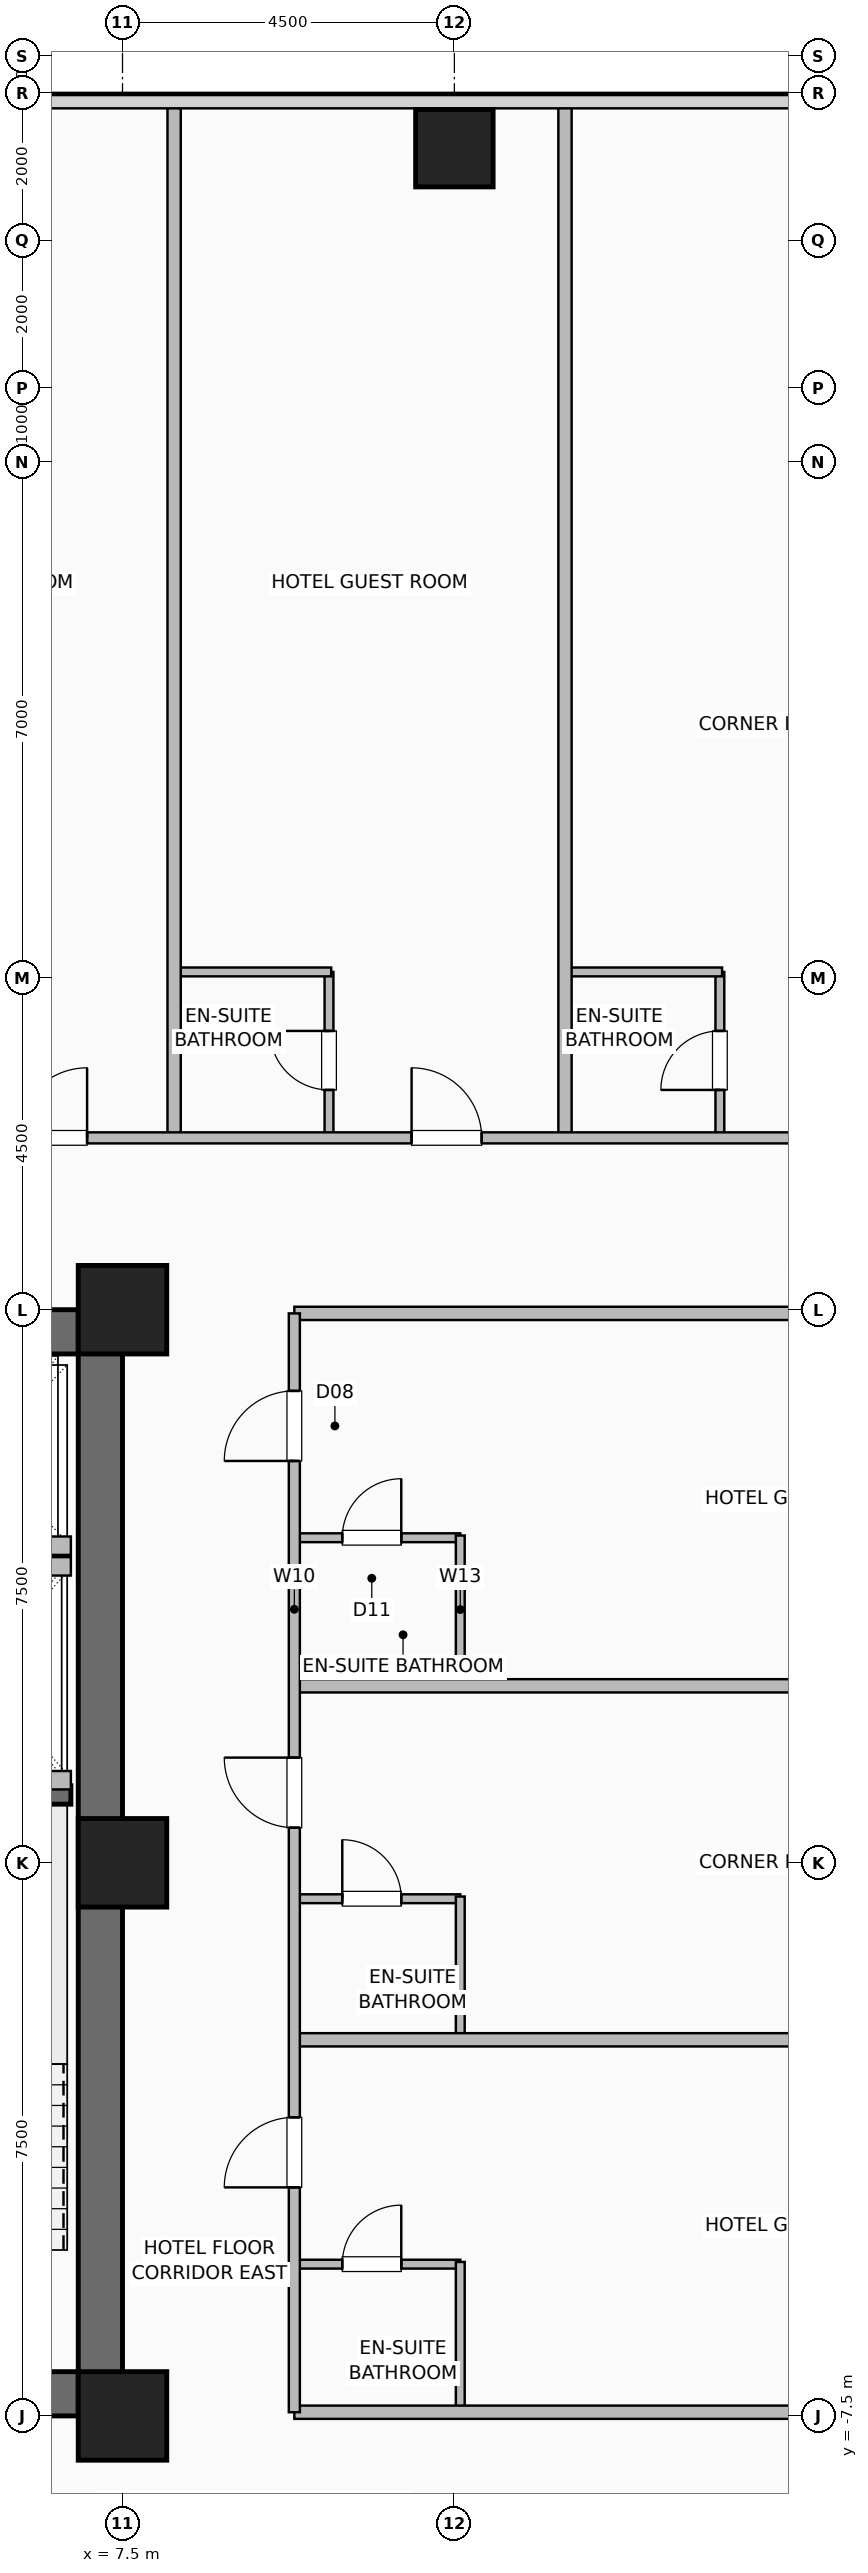
"""IFC4 building model, lengths in metres.
Left out: names, types, materials, properties, quantities, classifications, styles, units other than length and angle.
Written with IfcOpenShell. Run it as: python <this file> out.ifc"""

import sys

from ifc_helpers import new_model, si_unit, direction, frame, frame_2d, origin, origin_2d, place, context, subcontext, project, spatial, rectangle, hollow_rectangle, extrude, element, fill, save


model = new_model("IFC4")
c1 = context("Model", 3, precision=1e-05, world=origin(), true_north=direction((0.0, 1.0)))
c2 = subcontext(c1, "Body", "Model", "MODEL_VIEW")
j1 = project(units=[si_unit("LENGTHUNIT", "METRE"), si_unit("PLANEANGLEUNIT", "RADIAN")], contexts=[c1])
p1 = place(None, origin())
s1 = spatial("IfcSite", under=j1, at=p1, CompositionType="ELEMENT")
p2 = place(p1, origin())
s2 = spatial("IfcBuilding", under=s1, at=p2, CompositionType="ELEMENT")
p3 = place(p2, frame((0.0, 0.0, 72.5)))
s3 = spatial("IfcBuildingStorey", under=s2, at=p3, CompositionType="ELEMENT", Elevation=72.5)
for number, where, z_axis, x_axis in (
    (1, (7.5, -7.5, 0.0), (0.0, 0.0, 1.0), (1.0, 0.0, 0.0)),
    (2, (7.5, 0.0, 0.0), (0.0, 0.0, 1.0), (1.0, 0.0, 0.0)),
    (3, (7.5, 7.5, 0.0), (0.0, 0.0, 1.0), (1.0, 0.0, 0.0)),
):
    element("IfcColumn", number, at=place(p3, frame(where, z_axis=z_axis, x_axis=x_axis)), inside=s3, PredefinedType="COLUMN", context=c2, shape_type="SweptSolid", body=[
        extrude(hollow_rectangle(XDim=1.2, YDim=1.2, WallThickness=0.055, at=origin_2d()), origin(), (0.0, 0.0, 1.0), 3.5),
    ])
p4 = place(p3, frame((12.0, 23.25, 0.0), z_axis=(0.0, 0.0, 1.0), x_axis=(1.0, 0.0, 0.0)))
e4 = element("IfcColumn", 4, at=p4, inside=s3, PredefinedType="COLUMN", context=c2, shape_type="SweptSolid", body=[
    extrude(hollow_rectangle(XDim=1.05, YDim=1.05, WallThickness=0.05, at=origin_2d()), origin(), (0.0, 0.0, 1.0), 3.5),
])
p5 = place(p3, frame((-7.5, -7.2, 0.0), z_axis=(0.0, 0.0, 1.0), x_axis=(1.0, 0.0, 0.0)))
e5 = element("IfcWall", 5, at=p5, inside=s3, PredefinedType="SHEAR", context=c2, shape_type="SweptSolid", body=[
    extrude(rectangle(XDim=15.0, YDim=0.6, at=frame_2d((7.5, 0.0))), origin(), (0.0, 0.0, 1.0), 3.25),
])
p6 = place(p5, frame((1.55, 0.0, 0.0)))
e6 = element("IfcOpeningElement", 6, at=p6, cuts=e5, PredefinedType="OPENING", context=c2, shape_type="SweptSolid", body=[
    extrude(rectangle(XDim=1.05, YDim=2.08, at=frame_2d((0.525, 1.04))), frame((0.0, 0.31, 0.0), z_axis=(0.0, -1.0, 0.0), x_axis=(1.0, 0.0, 0.0)), (0.0, 0.0, 1.0), 0.62),
])
p7 = place(p5, frame((12.4, 0.0, 0.0)))
e7 = element("IfcOpeningElement", 7, at=p7, cuts=e5, PredefinedType="OPENING", context=c2, shape_type="SweptSolid", body=[
    extrude(rectangle(XDim=1.05, YDim=2.08, at=frame_2d((0.525, 1.04))), frame((0.0, 0.31, 0.0), z_axis=(0.0, -1.0, 0.0), x_axis=(1.0, 0.0, 0.0)), (0.0, 0.0, 1.0), 0.62),
])
p8 = place(p5, frame((4.64, 0.0, 0.0)))
e8 = element("IfcOpeningElement", 8, at=p8, cuts=e5, PredefinedType="OPENING", context=c2, shape_type="SweptSolid", body=[
    extrude(rectangle(XDim=1.1, YDim=2.2, at=frame_2d((0.55, 1.1))), frame((0.0, 0.31, 0.0), z_axis=(0.0, -1.0, 0.0), x_axis=(1.0, 0.0, 0.0)), (0.0, 0.0, 1.0), 0.62),
])
p9 = place(p5, frame((6.52, 0.0, 0.0)))
e9 = element("IfcOpeningElement", 9, at=p9, cuts=e5, PredefinedType="OPENING", context=c2, shape_type="SweptSolid", body=[
    extrude(rectangle(XDim=1.1, YDim=2.2, at=frame_2d((0.55, 1.1))), frame((0.0, 0.31, 0.0), z_axis=(0.0, -1.0, 0.0), x_axis=(1.0, 0.0, 0.0)), (0.0, 0.0, 1.0), 0.62),
])
p10 = place(p5, frame((8.4, 0.0, 0.0)))
e10 = element("IfcOpeningElement", 10, at=p10, cuts=e5, PredefinedType="OPENING", context=c2, shape_type="SweptSolid", body=[
    extrude(rectangle(XDim=1.1, YDim=2.2, at=frame_2d((0.55, 1.1))), frame((0.0, 0.31, 0.0), z_axis=(0.0, -1.0, 0.0), x_axis=(1.0, 0.0, 0.0)), (0.0, 0.0, 1.0), 0.62),
])
for number, where, z_axis, x_axis in (
    (11, (-7.5, 7.2, 0.0), (0.0, 0.0, 1.0), (1.0, 0.0, 0.0)),
    (12, (7.2, -7.5, 0.0), (0.0, 0.0, 1.0), (0.0, 1.0, 0.0)),
):
    element("IfcWall", number, at=place(p3, frame(where, z_axis=z_axis, x_axis=x_axis)), inside=s3, PredefinedType="SHEAR", context=c2, shape_type="SweptSolid", body=[
        extrude(rectangle(XDim=15.0, YDim=0.6, at=frame_2d((7.5, 0.0))), origin(), (0.0, 0.0, 1.0), 3.25),
    ])
p11 = place(p3, frame((3.47, 0.92, 0.0), z_axis=(0.0, 0.0, 1.0), x_axis=(1.0, 0.0, 0.0)))
e13 = element("IfcWall", 13, at=p11, inside=s3, PredefinedType="SHEAR", context=c2, shape_type="SweptSolid", body=[
    extrude(rectangle(XDim=3.33, YDim=0.25, at=frame_2d((1.665, 0.0))), origin(), (0.0, 0.0, 1.0), 3.25),
])
p12 = place(p3, frame((4.38, 4.3, 0.0), z_axis=(0.0, 0.0, 1.0), x_axis=(1.0, 0.0, 0.0)))
e14 = element("IfcWall", 14, at=p12, inside=s3, PredefinedType="SHEAR", context=c2, shape_type="SweptSolid", body=[
    extrude(rectangle(XDim=2.42, YDim=0.25, at=frame_2d((1.21, 0.0))), origin(), (0.0, 0.0, 1.0), 3.25),
])
for number, where, z_axis, x_axis in (
    (15, (4.28, 1.12, 0.0), (0.0, 0.0, 1.0), (1.0, 0.0, 0.0)),
    (16, (4.28, 4.02, 0.0), (0.0, 0.0, 1.0), (1.0, 0.0, 0.0)),
):
    element("IfcWall", number, at=place(p3, frame(where, z_axis=z_axis, x_axis=x_axis)), inside=s3, PredefinedType="SHEAR", context=c2, shape_type="SweptSolid", body=[
        extrude(rectangle(XDim=2.52, YDim=0.25, at=frame_2d((1.26, 0.0))), origin(), (0.0, 0.0, 1.0), 3.25),
    ])
p13 = place(p3, frame((10.3, 9.83, 0.0), z_axis=(0.0, 0.0, 1.0), x_axis=(0.0, 1.0, 0.0)))
e17 = element("IfcWall", 17, at=p13, inside=s3, PredefinedType="PLUMBINGWALL", context=c2, shape_type="SweptSolid", body=[
    extrude(rectangle(XDim=2.25, YDim=0.12, at=frame_2d((1.125, 0.0))), origin(), (0.0, 0.0, 1.0), 3.25),
])
p14 = place(p13, frame((0.65, 0.0, 0.0)))
e18 = element("IfcOpeningElement", 18, at=p14, cuts=e17, PredefinedType="OPENING", context=c2, shape_type="SweptSolid", body=[
    extrude(rectangle(XDim=0.8, YDim=2.05, at=frame_2d((0.4, 1.025))), frame((0.0, 0.07, 0.0), z_axis=(0.0, -1.0, 0.0), x_axis=(1.0, 0.0, 0.0)), (0.0, 0.0, 1.0), 0.14),
])
p15 = place(p3, frame((8.23, 12.08, 0.0), z_axis=(0.0, 0.0, 1.0), x_axis=(1.0, 0.0, 0.0)))
e19 = element("IfcWall", 19, at=p15, inside=s3, PredefinedType="PLUMBINGWALL", context=c2, shape_type="SweptSolid", body=[
    extrude(rectangle(XDim=2.1, YDim=0.12, at=frame_2d((1.05, 0.0))), origin(), (0.0, 0.0, 1.0), 3.25),
])
p16 = place(p3, frame((15.6, 9.83, 0.0), z_axis=(0.0, 0.0, 1.0), x_axis=(0.0, 1.0, 0.0)))
e20 = element("IfcWall", 20, at=p16, inside=s3, PredefinedType="PLUMBINGWALL", context=c2, shape_type="SweptSolid", body=[
    extrude(rectangle(XDim=2.25, YDim=0.12, at=frame_2d((1.125, 0.0))), origin(), (0.0, 0.0, 1.0), 3.25),
])
p17 = place(p16, frame((0.65, 0.0, 0.0)))
e21 = element("IfcOpeningElement", 21, at=p17, cuts=e20, PredefinedType="OPENING", context=c2, shape_type="SweptSolid", body=[
    extrude(rectangle(XDim=0.8, YDim=2.05, at=frame_2d((0.4, 1.025))), frame((0.0, 0.07, 0.0), z_axis=(0.0, -1.0, 0.0), x_axis=(1.0, 0.0, 0.0)), (0.0, 0.0, 1.0), 0.14),
])
p18 = place(p3, frame((13.53, 12.08, 0.0), z_axis=(0.0, 0.0, 1.0), x_axis=(1.0, 0.0, 0.0)))
e22 = element("IfcWall", 22, at=p18, inside=s3, PredefinedType="PLUMBINGWALL", context=c2, shape_type="SweptSolid", body=[
    extrude(rectangle(XDim=2.1, YDim=0.12, at=frame_2d((1.05, 0.0))), origin(), (0.0, 0.0, 1.0), 3.25),
])
for number, where, z_axis, x_axis in (
    (23, (8.2, 9.83, 0.0), (0.0, 0.0, 1.0), (0.0, 1.0, 0.0)),
    (24, (13.5, 9.83, 0.0), (0.0, 0.0, 1.0), (0.0, 1.0, 0.0)),
):
    element("IfcWall", number, at=place(p3, frame(where, z_axis=z_axis, x_axis=x_axis)), inside=s3, PredefinedType="PARTITIONING", context=c2, shape_type="SweptSolid", body=[
        extrude(rectangle(XDim=13.99, YDim=0.18, at=frame_2d((6.995, 0.0))), origin(), (0.0, 0.0, 1.0), 3.25),
    ])
p19 = place(p3, frame((-19.95, 9.83, 0.0), z_axis=(0.0, 0.0, 1.0), x_axis=(1.0, 0.0, 0.0)))
e25 = element("IfcWall", 25, at=p19, inside=s3, PredefinedType="PARTITIONING", context=c2, shape_type="SweptSolid", body=[
    extrude(rectangle(XDim=39.9, YDim=0.15, at=frame_2d((19.95, 0.0))), origin(), (0.0, 0.0, 1.0), 3.25),
])
p20 = place(p19, frame((3.945, 0.0, 0.0)))
e26 = element("IfcOpeningElement", 26, at=p20, cuts=e25, PredefinedType="OPENING", context=c2, shape_type="SweptSolid", body=[
    extrude(rectangle(XDim=0.95, YDim=2.08, at=frame_2d((0.475, 1.04))), frame((0.0, 0.085, 0.0), z_axis=(0.0, -1.0, 0.0), x_axis=(1.0, 0.0, 0.0)), (0.0, 0.0, 1.0), 0.17),
])
p21 = place(p19, frame((10.02, 0.0, 0.0)))
e27 = element("IfcOpeningElement", 27, at=p21, cuts=e25, PredefinedType="OPENING", context=c2, shape_type="SweptSolid", body=[
    extrude(rectangle(XDim=0.95, YDim=2.08, at=frame_2d((0.475, 1.04))), frame((0.0, 0.085, 0.0), z_axis=(0.0, -1.0, 0.0), x_axis=(1.0, 0.0, 0.0)), (0.0, 0.0, 1.0), 0.17),
])
p22 = place(p19, frame((15.42, 0.0, 0.0)))
e28 = element("IfcOpeningElement", 28, at=p22, cuts=e25, PredefinedType="OPENING", context=c2, shape_type="SweptSolid", body=[
    extrude(rectangle(XDim=0.95, YDim=2.08, at=frame_2d((0.475, 1.04))), frame((0.0, 0.085, 0.0), z_axis=(0.0, -1.0, 0.0), x_axis=(1.0, 0.0, 0.0)), (0.0, 0.0, 1.0), 0.17),
])
p23 = place(p19, frame((20.702, 0.0, 0.0)))
e29 = element("IfcOpeningElement", 29, at=p23, cuts=e25, PredefinedType="OPENING", context=c2, shape_type="SweptSolid", body=[
    extrude(rectangle(XDim=0.95, YDim=2.08, at=frame_2d((0.475, 1.04))), frame((0.0, 0.085, 0.0), z_axis=(0.0, -1.0, 0.0), x_axis=(1.0, 0.0, 0.0)), (0.0, 0.0, 1.0), 0.17),
])
p24 = place(p19, frame((26.02, 0.0, 0.0)))
e30 = element("IfcOpeningElement", 30, at=p24, cuts=e25, PredefinedType="OPENING", context=c2, shape_type="SweptSolid", body=[
    extrude(rectangle(XDim=0.95, YDim=2.08, at=frame_2d((0.475, 1.04))), frame((0.0, 0.085, 0.0), z_axis=(0.0, -1.0, 0.0), x_axis=(1.0, 0.0, 0.0)), (0.0, 0.0, 1.0), 0.17),
])
p25 = place(p19, frame((31.37, 0.0, 0.0)))
e31 = element("IfcOpeningElement", 31, at=p25, cuts=e25, PredefinedType="OPENING", context=c2, shape_type="SweptSolid", body=[
    extrude(rectangle(XDim=0.95, YDim=2.08, at=frame_2d((0.475, 1.04))), frame((0.0, 0.085, 0.0), z_axis=(0.0, -1.0, 0.0), x_axis=(1.0, 0.0, 0.0)), (0.0, 0.0, 1.0), 0.17),
])
p26 = place(p19, frame((37.245, 0.0, 0.0)))
e32 = element("IfcOpeningElement", 32, at=p26, cuts=e25, PredefinedType="OPENING", context=c2, shape_type="SweptSolid", body=[
    extrude(rectangle(XDim=0.95, YDim=2.08, at=frame_2d((0.475, 1.04))), frame((0.0, 0.085, 0.0), z_axis=(0.0, -1.0, 0.0), x_axis=(1.0, 0.0, 0.0)), (0.0, 0.0, 1.0), 0.17),
])
p27 = place(p3, frame((9.83, -5.442, 0.0), z_axis=(0.0, 0.0, 1.0), x_axis=(1.0, 0.0, 0.0)))
e33 = element("IfcWall", 33, at=p27, inside=s3, PredefinedType="PLUMBINGWALL", context=c2, shape_type="SweptSolid", body=[
    extrude(rectangle(XDim=2.25, YDim=0.12, at=frame_2d((1.125, 0.0))), origin(), (0.0, 0.0, 1.0), 3.25),
])
p28 = place(p27, frame((0.65, 0.0, 0.0)))
e34 = element("IfcOpeningElement", 34, at=p28, cuts=e33, PredefinedType="OPENING", context=c2, shape_type="SweptSolid", body=[
    extrude(rectangle(XDim=0.8, YDim=2.05, at=frame_2d((0.4, 1.025))), frame((0.0, 0.07, 0.0), z_axis=(0.0, -1.0, 0.0), x_axis=(1.0, 0.0, 0.0)), (0.0, 0.0, 1.0), 0.14),
])
p29 = place(p3, frame((12.08, -7.42, 0.0), z_axis=(0.0, 0.0, 1.0), x_axis=(0.0, 1.0, 0.0)))
e35 = element("IfcWall", 35, at=p29, inside=s3, PredefinedType="PLUMBINGWALL", context=c2, shape_type="SweptSolid", body=[
    extrude(rectangle(XDim=2.008, YDim=0.12, at=frame_2d((1.004, 0.0))), origin(), (0.0, 0.0, 1.0), 3.25),
])
p30 = place(p3, frame((9.83, -0.487, 0.0), z_axis=(0.0, 0.0, 1.0), x_axis=(1.0, 0.0, 0.0)))
e36 = element("IfcWall", 36, at=p30, inside=s3, PredefinedType="PLUMBINGWALL", context=c2, shape_type="SweptSolid", body=[
    extrude(rectangle(XDim=2.25, YDim=0.12, at=frame_2d((1.125, 0.0))), origin(), (0.0, 0.0, 1.0), 3.25),
])
p31 = place(p30, frame((0.65, 0.0, 0.0)))
e37 = element("IfcOpeningElement", 37, at=p31, cuts=e36, PredefinedType="OPENING", context=c2, shape_type="SweptSolid", body=[
    extrude(rectangle(XDim=0.8, YDim=2.05, at=frame_2d((0.4, 1.025))), frame((0.0, 0.07, 0.0), z_axis=(0.0, -1.0, 0.0), x_axis=(1.0, 0.0, 0.0)), (0.0, 0.0, 1.0), 0.14),
])
p32 = place(p3, frame((12.08, -2.37, 0.0), z_axis=(0.0, 0.0, 1.0), x_axis=(0.0, 1.0, 0.0)))
e38 = element("IfcWall", 38, at=p32, inside=s3, PredefinedType="PLUMBINGWALL", context=c2, shape_type="SweptSolid", body=[
    extrude(rectangle(XDim=1.913, YDim=0.12, at=frame_2d((0.957, 0.0))), origin(), (0.0, 0.0, 1.0), 3.25),
])
p33 = place(p3, frame((9.83, 4.408, 0.0), z_axis=(0.0, 0.0, 1.0), x_axis=(1.0, 0.0, 0.0)))
e39 = element("IfcWall", 39, at=p33, inside=s3, PredefinedType="PLUMBINGWALL", context=c2, shape_type="SweptSolid", body=[
    extrude(rectangle(XDim=2.25, YDim=0.12, at=frame_2d((1.125, 0.0))), origin(), (0.0, 0.0, 1.0), 3.25),
])
p34 = place(p33, frame((0.65, 0.0, 0.0)))
e40 = element("IfcOpeningElement", 40, at=p34, cuts=e39, PredefinedType="OPENING", context=c2, shape_type="SweptSolid", body=[
    extrude(rectangle(XDim=0.8, YDim=2.05, at=frame_2d((0.4, 1.025))), frame((0.0, 0.07, 0.0), z_axis=(0.0, -1.0, 0.0), x_axis=(1.0, 0.0, 0.0)), (0.0, 0.0, 1.0), 0.14),
])
p35 = place(p3, frame((12.08, 2.43, 0.0), z_axis=(0.0, 0.0, 1.0), x_axis=(0.0, 1.0, 0.0)))
e41 = element("IfcWall", 41, at=p35, inside=s3, PredefinedType="PLUMBINGWALL", context=c2, shape_type="SweptSolid", body=[
    extrude(rectangle(XDim=2.008, YDim=0.12, at=frame_2d((1.004, 0.0))), origin(), (0.0, 0.0, 1.0), 3.25),
])
for number, where, z_axis, x_axis in (
    (42, (9.83, -7.45, 0.0), (0.0, 0.0, 1.0), (1.0, 0.0, 0.0)),
    (43, (9.83, -2.4, 0.0), (0.0, 0.0, 1.0), (1.0, 0.0, 0.0)),
    (44, (9.83, 2.4, 0.0), (0.0, 0.0, 1.0), (1.0, 0.0, 0.0)),
    (45, (9.83, 7.45, 0.0), (0.0, 0.0, 1.0), (1.0, 0.0, 0.0)),
):
    element("IfcWall", number, at=place(p3, frame(where, z_axis=z_axis, x_axis=x_axis)), inside=s3, PredefinedType="PARTITIONING", context=c2, shape_type="SweptSolid", body=[
        extrude(rectangle(XDim=13.99, YDim=0.18, at=frame_2d((6.995, 0.0))), origin(), (0.0, 0.0, 1.0), 3.25),
    ])
p36 = place(p3, frame((9.83, -7.45, 0.0), z_axis=(0.0, 0.0, 1.0), x_axis=(0.0, 1.0, 0.0)))
e46 = element("IfcWall", 46, at=p36, inside=s3, PredefinedType="PARTITIONING", context=c2, shape_type="SweptSolid", body=[
    extrude(rectangle(XDim=14.9, YDim=0.15, at=frame_2d((7.45, 0.0))), origin(), (0.0, 0.0, 1.0), 3.25),
])
p37 = place(p36, frame((3.049, 0.0, 0.0)))
e47 = element("IfcOpeningElement", 47, at=p37, cuts=e46, PredefinedType="OPENING", context=c2, shape_type="SweptSolid", body=[
    extrude(rectangle(XDim=0.95, YDim=2.08, at=frame_2d((0.475, 1.04))), frame((0.0, 0.085, 0.0), z_axis=(0.0, -1.0, 0.0), x_axis=(1.0, 0.0, 0.0)), (0.0, 0.0, 1.0), 0.17),
])
p38 = place(p36, frame((7.927, 0.0, 0.0)))
e48 = element("IfcOpeningElement", 48, at=p38, cuts=e46, PredefinedType="OPENING", context=c2, shape_type="SweptSolid", body=[
    extrude(rectangle(XDim=0.95, YDim=2.08, at=frame_2d((0.475, 1.04))), frame((0.0, 0.085, 0.0), z_axis=(0.0, -1.0, 0.0), x_axis=(1.0, 0.0, 0.0)), (0.0, 0.0, 1.0), 0.17),
])
p39 = place(p36, frame((12.899, 0.0, 0.0)))
e49 = element("IfcOpeningElement", 49, at=p39, cuts=e46, PredefinedType="OPENING", context=c2, shape_type="SweptSolid", body=[
    extrude(rectangle(XDim=0.95, YDim=2.08, at=frame_2d((0.475, 1.04))), frame((0.0, 0.085, 0.0), z_axis=(0.0, -1.0, 0.0), x_axis=(1.0, 0.0, 0.0)), (0.0, 0.0, 1.0), 0.17),
])
p40 = place(p14, origin())
e50 = element("IfcDoor", 50, at=p40, inside=s3, OperationType="SINGLE_SWING_RIGHT", PredefinedType="DOOR", context=c2, shape_type="SweptSolid", body=[
    extrude(rectangle(XDim=0.8, YDim=2.05, at=frame_2d((0.4, 1.025))), frame((0.0, 0.025, 0.0), z_axis=(0.0, -1.0, 0.0), x_axis=(1.0, 0.0, 0.0)), (0.0, 0.0, 1.0), 0.05),
])
fill(e18, e50)
p41 = place(p17, origin())
e51 = element("IfcDoor", 51, at=p41, inside=s3, OperationType="SINGLE_SWING_LEFT", PredefinedType="DOOR", context=c2, shape_type="SweptSolid", body=[
    extrude(rectangle(XDim=0.8, YDim=2.05, at=frame_2d((0.4, 1.025))), frame((0.0, 0.025, 0.0), z_axis=(0.0, -1.0, 0.0), x_axis=(1.0, 0.0, 0.0)), (0.0, 0.0, 1.0), 0.05),
])
fill(e21, e51)
p42 = place(p24, origin())
e52 = element("IfcDoor", 52, at=p42, inside=s3, OperationType="SINGLE_SWING_RIGHT", PredefinedType="DOOR", context=c2, shape_type="SweptSolid", body=[
    extrude(rectangle(XDim=0.95, YDim=2.08, at=frame_2d((0.475, 1.04))), frame((0.0, 0.025, 0.0), z_axis=(0.0, -1.0, 0.0), x_axis=(1.0, 0.0, 0.0)), (0.0, 0.0, 1.0), 0.05),
])
fill(e30, e52)
p43 = place(p25, origin())
e53 = element("IfcDoor", 53, at=p43, inside=s3, OperationType="SINGLE_SWING_LEFT", PredefinedType="DOOR", context=c2, shape_type="SweptSolid", body=[
    extrude(rectangle(XDim=0.95, YDim=2.08, at=frame_2d((0.475, 1.04))), frame((0.0, 0.025, 0.0), z_axis=(0.0, -1.0, 0.0), x_axis=(1.0, 0.0, 0.0)), (0.0, 0.0, 1.0), 0.05),
])
fill(e31, e53)
p44 = place(p28, origin())
e54 = element("IfcDoor", 54, at=p44, inside=s3, OperationType="SINGLE_SWING_RIGHT", PredefinedType="DOOR", context=c2, shape_type="SweptSolid", body=[
    extrude(rectangle(XDim=0.8, YDim=2.05, at=frame_2d((0.4, 1.025))), frame((0.0, 0.025, 0.0), z_axis=(0.0, -1.0, 0.0), x_axis=(1.0, 0.0, 0.0)), (0.0, 0.0, 1.0), 0.05),
])
fill(e34, e54)
p45 = place(p31, origin())
e55 = element("IfcDoor", 55, at=p45, inside=s3, OperationType="SINGLE_SWING_LEFT", PredefinedType="DOOR", context=c2, shape_type="SweptSolid", body=[
    extrude(rectangle(XDim=0.8, YDim=2.05, at=frame_2d((0.4, 1.025))), frame((0.0, 0.025, 0.0), z_axis=(0.0, -1.0, 0.0), x_axis=(1.0, 0.0, 0.0)), (0.0, 0.0, 1.0), 0.05),
])
fill(e37, e55)
p46 = place(p34, origin())
e56 = element("IfcDoor", 56, at=p46, inside=s3, OperationType="SINGLE_SWING_RIGHT", PredefinedType="DOOR", context=c2, shape_type="SweptSolid", body=[
    extrude(rectangle(XDim=0.8, YDim=2.05, at=frame_2d((0.4, 1.025))), frame((0.0, 0.025, 0.0), z_axis=(0.0, -1.0, 0.0), x_axis=(1.0, 0.0, 0.0)), (0.0, 0.0, 1.0), 0.05),
])
fill(e40, e56)
p47 = place(p37, origin())
e57 = element("IfcDoor", 57, at=p47, inside=s3, OperationType="SINGLE_SWING_LEFT", PredefinedType="DOOR", context=c2, shape_type="SweptSolid", body=[
    extrude(rectangle(XDim=0.95, YDim=2.08, at=frame_2d((0.475, 1.04))), frame((0.0, 0.025, 0.0), z_axis=(0.0, -1.0, 0.0), x_axis=(1.0, 0.0, 0.0)), (0.0, 0.0, 1.0), 0.05),
])
fill(e47, e57)
p48 = place(p38, origin())
e58 = element("IfcDoor", 58, at=p48, inside=s3, OperationType="SINGLE_SWING_RIGHT", PredefinedType="DOOR", context=c2, shape_type="SweptSolid", body=[
    extrude(rectangle(XDim=0.95, YDim=2.08, at=frame_2d((0.475, 1.04))), frame((0.0, 0.025, 0.0), z_axis=(0.0, -1.0, 0.0), x_axis=(1.0, 0.0, 0.0)), (0.0, 0.0, 1.0), 0.05),
])
fill(e48, e58)
p49 = place(p39, origin())
e59 = element("IfcDoor", 59, at=p49, inside=s3, OperationType="SINGLE_SWING_LEFT", PredefinedType="DOOR", context=c2, shape_type="SweptSolid", body=[
    extrude(rectangle(XDim=0.95, YDim=2.08, at=frame_2d((0.475, 1.04))), frame((0.0, 0.025, 0.0), z_axis=(0.0, -1.0, 0.0), x_axis=(1.0, 0.0, 0.0)), (0.0, 0.0, 1.0), 0.05),
])
fill(e49, e59)
save(model, sys.argv[1])
